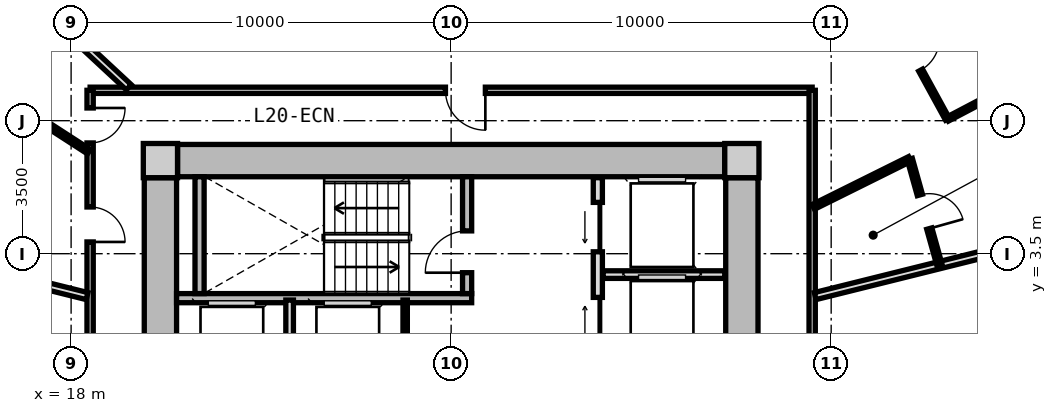
"""IFC4 building model, lengths in metres.
Left out: names, types, materials, properties, quantities, classifications, styles, units other than length and angle.
Written with IfcOpenShell. Run it as: python <this file> out.ifc"""

import sys

from ifc_helpers import new_model, si_unit, direction, frame, frame_2d, origin, origin_2d, place, context, subcontext, project, spatial, rectangle, extrude, source, transform, mapped, element, fill, save


model = new_model("IFC4")
c1 = context("Model", 3, precision=1e-05, world=origin(), true_north=direction((0.0, 1.0)))
c2 = subcontext(c1, "Body", "Model", "MODEL_VIEW")
j1 = project(units=[si_unit("LENGTHUNIT", "METRE"), si_unit("PLANEANGLEUNIT", "RADIAN")], contexts=[c1])
p1 = place(None, origin())
s1 = spatial("IfcSite", under=j1, at=p1, CompositionType="ELEMENT")
p2 = place(p1, origin())
s2 = spatial("IfcBuilding", under=s1, at=p2, CompositionType="ELEMENT")
p3 = place(p2, frame((0.0, 0.0, 67.35)))
s3 = spatial("IfcBuildingStorey", under=s2, at=p3, CompositionType="ELEMENT", Elevation=67.35)
m1 = source(origin(), c2, "Body", "SweptSolid", [
    extrude(rectangle(XDim=0.9, YDim=0.9, at=origin_2d()), origin(), (0.0, 0.0, 1.0), 3.05),
])
for number, where, z_axis, x_axis in (
    (1, (35.65, 5.95, 0.0), (0.0, 0.0, 1.0), (1.0, 0.0, 0.0)),
    (2, (20.35, 5.95, 0.0), (0.0, 0.0, 1.0), (1.0, 0.0, 0.0)),
):
    element("IfcColumn", number, at=place(p3, frame(where, z_axis=z_axis, x_axis=x_axis)), inside=s3, PredefinedType="COLUMN", context=c2, shape_type="MappedRepresentation", body=[
        mapped(m1, transform((0.0, 0.0, 0.0), x_axis=(1.0, 0.0, 0.0), y_axis=(0.0, 1.0, 0.0), z_axis=(0.0, 0.0, 1.0), scale=1.0)),
    ])
m2 = source(origin(), c2, "Body", "SweptSolid", [
    extrude(rectangle(XDim=14.4, YDim=0.85, at=frame_2d((7.2, 0.0))), origin(), (0.0, 0.0, 1.0), 2.79),
])
p4 = place(p3, frame((20.8, 5.95, 0.0), z_axis=(0.0, 0.0, 1.0), x_axis=(1.0, 0.0, 0.0)))
e3 = element("IfcWall", 3, at=p4, inside=s3, PredefinedType="SHEAR", context=c2, shape_type="MappedRepresentation", body=[
    mapped(m2, transform((0.0, 0.0, 0.0), x_axis=(1.0, 0.0, 0.0), y_axis=(0.0, 1.0, 0.0), z_axis=(0.0, 0.0, 1.0), scale=1.0)),
])
m3 = source(origin(), c2, "Body", "SweptSolid", [
    extrude(rectangle(XDim=11.0, YDim=0.85, at=frame_2d((5.5, 0.0))), origin(), (0.0, 0.0, 1.0), 2.79),
])
p5 = place(p3, frame((20.35, -5.5, 0.0), z_axis=(0.0, 0.0, 1.0), x_axis=(0.0, 1.0, 0.0)))
e4 = element("IfcWall", 4, at=p5, inside=s3, PredefinedType="SHEAR", context=c2, shape_type="MappedRepresentation", body=[
    mapped(m3, transform((0.0, 0.0, 0.0), x_axis=(1.0, 0.0, 0.0), y_axis=(0.0, 1.0, 0.0), z_axis=(0.0, 0.0, 1.0), scale=1.0)),
])
p6 = place(p5, frame((3.8, 0.0, 0.0)))
e5 = element("IfcOpeningElement", 5, at=p6, cuts=e4, PredefinedType="OPENING", context=c2, shape_type="SweptSolid", body=[
    extrude(rectangle(XDim=1.2, YDim=2.15, at=frame_2d((0.6, 1.075))), frame((0.0, 0.435, 0.0), z_axis=(0.0, -1.0, 0.0), x_axis=(1.0, 0.0, 0.0)), (0.0, 0.0, 1.0), 0.87),
])
p7 = place(p3, frame((35.65, 5.5, 0.0), z_axis=(0.0, 0.0, 1.0), x_axis=(0.0, -1.0, 0.0)))
e6 = element("IfcWall", 6, at=p7, inside=s3, PredefinedType="SHEAR", context=c2, shape_type="MappedRepresentation", body=[
    mapped(m3, transform((0.0, 0.0, 0.0), x_axis=(1.0, 0.0, 0.0), y_axis=(0.0, 1.0, 0.0), z_axis=(0.0, 0.0, 1.0), scale=1.0)),
])
p8 = place(p7, frame((5.65, 0.0, 0.0)))
e7 = element("IfcOpeningElement", 7, at=p8, cuts=e6, PredefinedType="OPENING", context=c2, shape_type="SweptSolid", body=[
    extrude(rectangle(XDim=1.2, YDim=2.15, at=frame_2d((0.6, 1.075))), frame((0.0, 0.435, 0.0), z_axis=(0.0, -1.0, 0.0), x_axis=(1.0, 0.0, 0.0)), (0.0, 0.0, 1.0), 0.87),
])
m4 = source(origin(), c2, "Body", "SweptSolid", [
    extrude(rectangle(XDim=7.765, YDim=0.24, at=frame_2d((3.883, 0.0))), origin(), (0.0, 0.0, 1.0), 2.79),
])
p9 = place(p3, frame((20.775, 2.33, 0.0), z_axis=(0.0, 0.0, 1.0), x_axis=(1.0, 0.0, 0.0)))
e8 = element("IfcWall", 8, at=p9, inside=s3, PredefinedType="PARTITIONING", context=c2, shape_type="MappedRepresentation", body=[
    mapped(m4, transform((0.0, 0.0, 0.0), x_axis=(1.0, 0.0, 0.0), y_axis=(0.0, 1.0, 0.0), z_axis=(0.0, 0.0, 1.0), scale=1.0)),
])
m5 = source(origin(), c2, "Body", "SweptSolid", [
    extrude(rectangle(XDim=3.075, YDim=0.24, at=frame_2d((1.538, 0.0))), origin(), (0.0, 0.0, 1.0), 2.79),
])
p10 = place(p3, frame((21.38, 2.45, 0.0), z_axis=(0.0, 0.0, 1.0), x_axis=(0.0, 1.0, 0.0)))
e9 = element("IfcWall", 9, at=p10, inside=s3, PredefinedType="PARTITIONING", context=c2, shape_type="MappedRepresentation", body=[
    mapped(m5, transform((0.0, 0.0, 0.0), x_axis=(1.0, 0.0, 0.0), y_axis=(0.0, 1.0, 0.0), z_axis=(0.0, 0.0, 1.0), scale=1.0)),
])
p11 = place(p3, frame((28.42, 2.45, 0.0), z_axis=(0.0, 0.0, 1.0), x_axis=(0.0, 1.0, 0.0)))
e10 = element("IfcWall", 10, at=p11, inside=s3, PredefinedType="PARTITIONING", context=c2, shape_type="MappedRepresentation", body=[
    mapped(m5, transform((0.0, 0.0, 0.0), x_axis=(1.0, 0.0, 0.0), y_axis=(0.0, 1.0, 0.0), z_axis=(0.0, 0.0, 1.0), scale=1.0)),
])
p12 = place(p11, frame((0.55, 0.0, 0.0)))
e11 = element("IfcOpeningElement", 11, at=p12, cuts=e10, PredefinedType="OPENING", context=c2, shape_type="SweptSolid", body=[
    extrude(rectangle(XDim=1.1, YDim=2.15, at=frame_2d((0.55, 1.075))), frame((0.0, 0.13, 0.0), z_axis=(0.0, -1.0, 0.0), x_axis=(1.0, 0.0, 0.0)), (0.0, 0.0, 1.0), 0.26),
])
m6 = source(origin(), c2, "Body", "SweptSolid", [
    extrude(rectangle(XDim=5.0, YDim=0.24, at=frame_2d((2.5, 0.0))), origin(), (0.0, 0.0, 1.0), 2.775),
])
p13 = place(p3, frame((31.86, 0.5, 0.0), z_axis=(0.0, 0.0, 1.0), x_axis=(0.0, 1.0, 0.0)))
e12 = element("IfcWall", 12, at=p13, inside=s3, PredefinedType="PARTITIONING", context=c2, shape_type="MappedRepresentation", body=[
    mapped(m6, transform((0.0, 0.0, 0.0), x_axis=(1.0, 0.0, 0.0), y_axis=(0.0, 1.0, 0.0), z_axis=(0.0, 0.0, 1.0), scale=1.0)),
])
p14 = place(p13, frame((3.05, 0.0, 0.0)))
e13 = element("IfcOpeningElement", 13, at=p14, cuts=e12, PredefinedType="OPENING", context=c2, shape_type="SweptSolid", body=[
    extrude(rectangle(XDim=1.3, YDim=2.2, at=frame_2d((0.65, 1.1))), frame((0.0, 0.13, 0.0), z_axis=(0.0, -1.0, 0.0), x_axis=(1.0, 0.0, 0.0)), (0.0, 0.0, 1.0), 0.26),
])
p15 = place(p13, frame((0.55, 0.0, 0.0)))
e14 = element("IfcOpeningElement", 14, at=p15, cuts=e12, PredefinedType="OPENING", context=c2, shape_type="SweptSolid", body=[
    extrude(rectangle(XDim=1.3, YDim=2.2, at=frame_2d((0.65, 1.1))), frame((0.0, 0.13, 0.0), z_axis=(0.0, -1.0, 0.0), x_axis=(1.0, 0.0, 0.0)), (0.0, 0.0, 1.0), 0.26),
])
m7 = source(origin(), c2, "Body", "SweptSolid", [
    extrude(rectangle(XDim=3.2, YDim=0.2, at=frame_2d((1.6, 0.0))), origin(), (0.0, 0.0, 1.0), 2.775),
])
p16 = place(p3, frame((32.0, 2.95, 0.0), z_axis=(0.0, 0.0, 1.0), x_axis=(1.0, 0.0, 0.0)))
e15 = element("IfcWall", 15, at=p16, inside=s3, PredefinedType="PARTITIONING", context=c2, shape_type="MappedRepresentation", body=[
    mapped(m7, transform((0.0, 0.0, 0.0), x_axis=(1.0, 0.0, 0.0), y_axis=(0.0, 1.0, 0.0), z_axis=(0.0, 0.0, 1.0), scale=1.0)),
])
m8 = source(origin(), c2, "Body", "SweptSolid", [
    extrude(rectangle(XDim=2.33, YDim=0.115, at=frame_2d((1.165, 0.0))), origin(), (0.0, 0.0, 1.0), 2.775),
])
p17 = place(p3, frame((26.79, -0.05, 0.0), z_axis=(0.0, 0.0, 1.0), x_axis=(0.0, 1.0, 0.0)))
e16 = element("IfcWall", 16, at=p17, inside=s3, PredefinedType="PARTITIONING", context=c2, shape_type="MappedRepresentation", body=[
    mapped(m8, transform((0.0, 0.0, 0.0), x_axis=(1.0, 0.0, 0.0), y_axis=(0.0, 1.0, 0.0), z_axis=(0.0, 0.0, 1.0), scale=1.0)),
])
m9 = source(origin(), c2, "Body", "SweptSolid", [
    extrude(rectangle(XDim=2.33, YDim=0.2, at=frame_2d((1.165, 0.0))), origin(), (0.0, 0.0, 1.0), 2.775),
])
p18 = place(p3, frame((23.75, -0.05, 0.0), z_axis=(0.0, 0.0, 1.0), x_axis=(0.0, 1.0, 0.0)))
e17 = element("IfcWall", 17, at=p18, inside=s3, PredefinedType="PARTITIONING", context=c2, shape_type="MappedRepresentation", body=[
    mapped(m9, transform((0.0, 0.0, 0.0), x_axis=(1.0, 0.0, 0.0), y_axis=(0.0, 1.0, 0.0), z_axis=(0.0, 0.0, 1.0), scale=1.0)),
])
m10 = source(origin(), c2, "Body", "SweptSolid", [
    extrude(rectangle(XDim=19.0, YDim=0.165, at=frame_2d((9.5, 0.0))), origin(), (0.0, 0.0, 1.0), 2.775),
])
p19 = place(p3, frame((18.5, 7.8, 0.0), z_axis=(0.0, 0.0, 1.0), x_axis=(1.0, 0.0, 0.0)))
e18 = element("IfcWall", 18, at=p19, inside=s3, PredefinedType="PARTITIONING", context=c2, shape_type="MappedRepresentation", body=[
    mapped(m10, transform((0.0, 0.0, 0.0), x_axis=(1.0, 0.0, 0.0), y_axis=(0.0, 1.0, 0.0), z_axis=(0.0, 0.0, 1.0), scale=1.0)),
])
p20 = place(p19, frame((9.35, 0.0, 0.0)))
e19 = element("IfcOpeningElement", 19, at=p20, cuts=e18, PredefinedType="OPENING", context=c2, shape_type="SweptSolid", body=[
    extrude(rectangle(XDim=1.05, YDim=2.15, at=frame_2d((0.525, 1.075))), frame((0.0, 0.093, 0.0), z_axis=(0.0, -1.0, 0.0), x_axis=(1.0, 0.0, 0.0)), (0.0, 0.0, 1.0), 0.185),
])
m11 = source(origin(), c2, "Body", "SweptSolid", [
    extrude(rectangle(XDim=15.6, YDim=0.165, at=frame_2d((7.8, 0.0))), origin(), (0.0, 0.0, 1.0), 2.775),
])
p21 = place(p3, frame((18.5, -7.8, 0.0), z_axis=(0.0, 0.0, 1.0), x_axis=(0.0, 1.0, 0.0)))
e20 = element("IfcWall", 20, at=p21, inside=s3, PredefinedType="PARTITIONING", context=c2, shape_type="MappedRepresentation", body=[
    mapped(m11, transform((0.0, 0.0, 0.0), x_axis=(1.0, 0.0, 0.0), y_axis=(0.0, 1.0, 0.0), z_axis=(0.0, 0.0, 1.0), scale=1.0)),
])
p22 = place(p21, frame((14.215, 0.0, 0.0)))
e21 = element("IfcOpeningElement", 21, at=p22, cuts=e20, PredefinedType="OPENING", context=c2, shape_type="SweptSolid", body=[
    extrude(rectangle(XDim=0.92, YDim=2.1, at=frame_2d((0.46, 1.05))), frame((0.0, 0.093, 0.0), z_axis=(0.0, -1.0, 0.0), x_axis=(1.0, 0.0, 0.0)), (0.0, 0.0, 1.0), 0.185),
])
p23 = place(p21, frame((11.609, 0.0, 0.0)))
e22 = element("IfcOpeningElement", 22, at=p23, cuts=e20, PredefinedType="OPENING", context=c2, shape_type="SweptSolid", body=[
    extrude(rectangle(XDim=0.92, YDim=2.1, at=frame_2d((0.46, 1.05))), frame((0.0, 0.093, 0.0), z_axis=(0.0, -1.0, 0.0), x_axis=(1.0, 0.0, 0.0)), (0.0, 0.0, 1.0), 0.185),
])
p24 = place(p21, frame((7.175, 0.0, 0.0)))
e23 = element("IfcOpeningElement", 23, at=p24, cuts=e20, PredefinedType="OPENING", context=c2, shape_type="SweptSolid", body=[
    extrude(rectangle(XDim=1.25, YDim=2.2, at=frame_2d((0.625, 1.1))), frame((0.0, 0.093, 0.0), z_axis=(0.0, -1.0, 0.0), x_axis=(1.0, 0.0, 0.0)), (0.0, 0.0, 1.0), 0.185),
])
p25 = place(p3, frame((37.5, 7.8, 0.0), z_axis=(0.0, 0.0, 1.0), x_axis=(0.0, -1.0, 0.0)))
e24 = element("IfcWall", 24, at=p25, inside=s3, PredefinedType="PARTITIONING", context=c2, shape_type="MappedRepresentation", body=[
    mapped(m11, transform((0.0, 0.0, 0.0), x_axis=(1.0, 0.0, 0.0), y_axis=(0.0, 1.0, 0.0), z_axis=(0.0, 0.0, 1.0), scale=1.0)),
])
p26 = place(p25, frame((8.835, 0.0, 0.0)))
e25 = element("IfcOpeningElement", 25, at=p26, cuts=e24, PredefinedType="OPENING", context=c2, shape_type="SweptSolid", body=[
    extrude(rectangle(XDim=1.05, YDim=2.15, at=frame_2d((0.525, 1.075))), frame((0.0, 0.093, 0.0), z_axis=(0.0, -1.0, 0.0), x_axis=(1.0, 0.0, 0.0)), (0.0, 0.0, 1.0), 0.185),
])
m12 = source(origin(), c2, "Body", "SweptSolid", [
    extrude(rectangle(XDim=9.737, YDim=0.19, at=frame_2d((4.869, 0.0))), origin(), (0.0, 0.0, 1.0), 2.225),
])
p27 = place(p3, frame((37.58, 2.385, 0.0), z_axis=(0.0, 0.0, 1.0), x_axis=(0.970392716238, 0.241532557375, 0.0)))
e26 = element("IfcWall", 26, at=p27, inside=s3, PredefinedType="PARTITIONING", context=c2, shape_type="MappedRepresentation", body=[
    mapped(m12, transform((0.0, 0.0, 0.0), x_axis=(1.0, 0.0, 0.0), y_axis=(0.0, 1.0, 0.0), z_axis=(0.0, 0.0, 1.0), scale=1.0)),
])
m13 = source(origin(), c2, "Body", "SweptSolid", [
    extrude(rectangle(XDim=7.435, YDim=0.19, at=frame_2d((3.717, 0.0))), origin(), (0.0, 0.0, 1.0), 2.225),
])
p28 = place(p3, frame((19.517, 7.88, 0.0), z_axis=(0.0, 0.0, 1.0), x_axis=(-0.732651956848, 0.680603489652, 0.0)))
e27 = element("IfcWall", 27, at=p28, inside=s3, PredefinedType="PARTITIONING", context=c2, shape_type="MappedRepresentation", body=[
    mapped(m13, transform((0.0, 0.0, 0.0), x_axis=(1.0, 0.0, 0.0), y_axis=(0.0, 1.0, 0.0), z_axis=(0.0, 0.0, 1.0), scale=1.0)),
])
m14 = source(origin(), c2, "Body", "SweptSolid", [
    extrude(rectangle(XDim=2.834, YDim=0.14, at=frame_2d((1.417, 0.0))), origin(), (0.0, 0.0, 1.0), 2.775),
])
p29 = place(p3, frame((37.53, 4.732, 0.0), z_axis=(0.0, 0.0, 1.0), x_axis=(0.895681174462, 0.444696788513, 0.0)))
e28 = element("IfcWall", 28, at=p29, inside=s3, PredefinedType="PARTITIONING", context=c2, shape_type="MappedRepresentation", body=[
    mapped(m14, transform((0.0, 0.0, 0.0), x_axis=(1.0, 0.0, 0.0), y_axis=(0.0, 1.0, 0.0), z_axis=(0.0, 0.0, 1.0), scale=1.0)),
])
m15 = source(origin(), c2, "Body", "SweptSolid", [
    extrude(rectangle(XDim=2.885, YDim=0.14, at=frame_2d((1.442, 0.0))), origin(), (0.0, 0.0, 1.0), 2.775),
])
p30 = place(p3, frame((40.069, 5.992, 0.0), z_axis=(0.0, 0.0, 1.0), x_axis=(0.269799431837, -0.962916541856, 0.0)))
e29 = element("IfcWall", 29, at=p30, inside=s3, PredefinedType="PARTITIONING", context=c2, shape_type="MappedRepresentation", body=[
    mapped(m15, transform((0.0, 0.0, 0.0), x_axis=(1.0, 0.0, 0.0), y_axis=(0.0, 1.0, 0.0), z_axis=(0.0, 0.0, 1.0), scale=1.0)),
])
p31 = place(p30, frame((0.982, 0.0, 0.0)))
e30 = element("IfcOpeningElement", 30, at=p31, cuts=e29, PredefinedType="OPENING", context=c2, shape_type="SweptSolid", body=[
    extrude(rectangle(XDim=0.92, YDim=2.1, at=frame_2d((0.46, 1.05))), frame((0.0, 0.08, 0.0), z_axis=(0.0, -1.0, 0.0), x_axis=(1.0, 0.0, 0.0)), (0.0, 0.0, 1.0), 0.16),
])
m16 = source(origin(), c2, "Body", "SweptSolid", [
    extrude(rectangle(XDim=3.864, YDim=0.115, at=frame_2d((1.932, 0.0))), origin(), (0.0, 0.0, 1.0), 2.775),
])
p32 = place(p3, frame((41.06, 7.041, 0.0), z_axis=(0.0, 0.0, 1.0), x_axis=(0.885194959803, 0.465220252289, 0.0)))
e31 = element("IfcWall", 31, at=p32, inside=s3, PredefinedType="PARTITIONING", context=c2, shape_type="MappedRepresentation", body=[
    mapped(m16, transform((0.0, 0.0, 0.0), x_axis=(1.0, 0.0, 0.0), y_axis=(0.0, 1.0, 0.0), z_axis=(0.0, 0.0, 1.0), scale=1.0)),
])
m17 = source(origin(), c2, "Body", "SweptSolid", [
    extrude(rectangle(XDim=3.888, YDim=0.115, at=frame_2d((1.944, 0.0))), origin(), (0.0, 0.0, 1.0), 2.775),
])
p33 = place(p3, frame((41.06, 7.041, 0.0), z_axis=(0.0, 0.0, 1.0), x_axis=(-0.480382482853, 0.877059103007, 0.0)))
e32 = element("IfcWall", 32, at=p33, inside=s3, PredefinedType="PARTITIONING", context=c2, shape_type="MappedRepresentation", body=[
    mapped(m17, transform((0.0, 0.0, 0.0), x_axis=(1.0, 0.0, 0.0), y_axis=(0.0, 1.0, 0.0), z_axis=(0.0, 0.0, 1.0), scale=1.0)),
])
p34 = place(p33, frame((1.469, 0.0, 0.0)))
e33 = element("IfcOpeningElement", 33, at=p34, cuts=e32, PredefinedType="OPENING", context=c2, shape_type="SweptSolid", body=[
    extrude(rectangle(XDim=0.95, YDim=2.1, at=frame_2d((0.475, 1.05))), frame((0.0, 0.067, 0.0), z_axis=(0.0, -1.0, 0.0), x_axis=(1.0, 0.0, 0.0)), (0.0, 0.0, 1.0), 0.135),
])
m18 = source(origin(), c2, "Body", "SweptSolid", [
    extrude(rectangle(XDim=9.737, YDim=0.19, at=frame_2d((4.869, 0.0))), origin(), (0.0, 0.0, 1.0), 2.415),
])
p35 = place(p3, frame((18.42, 2.385, 0.0), z_axis=(0.0, 0.0, 1.0), x_axis=(-0.970392716238, 0.241532557375, 0.0)))
e34 = element("IfcWall", 34, at=p35, inside=s3, PredefinedType="PARTITIONING", context=c2, shape_type="MappedRepresentation", body=[
    mapped(m18, transform((0.0, 0.0, 0.0), x_axis=(1.0, 0.0, 0.0), y_axis=(0.0, 1.0, 0.0), z_axis=(0.0, 0.0, 1.0), scale=1.0)),
])
m19 = source(origin(), c2, "Body", "SweptSolid", [
    extrude(rectangle(XDim=7.304, YDim=0.14, at=frame_2d((3.652, 0.0))), origin(), (0.0, 0.0, 1.0), 2.775),
])
p36 = place(p3, frame((18.47, 6.185, 0.0), z_axis=(0.0, 0.0, 1.0), x_axis=(-0.83973870965, 0.54299069929, 0.0)))
e35 = element("IfcWall", 35, at=p36, inside=s3, PredefinedType="PARTITIONING", context=c2, shape_type="MappedRepresentation", body=[
    mapped(m19, transform((0.0, 0.0, 0.0), x_axis=(1.0, 0.0, 0.0), y_axis=(0.0, 1.0, 0.0), z_axis=(0.0, 0.0, 1.0), scale=1.0)),
])
m20 = source(origin(), c2, "Body", "SweptSolid", [
    extrude(rectangle(XDim=1.1, YDim=2.15, at=frame_2d((0.55, 1.075))), frame((0.0, 0.025, 0.0), z_axis=(0.0, -1.0, 0.0), x_axis=(1.0, 0.0, 0.0)), (0.0, 0.0, 1.0), 0.05),
])
p37 = place(p12, origin())
e36 = element("IfcDoor", 36, at=p37, inside=s3, OperationType="SINGLE_SWING_LEFT", PredefinedType="DOOR", context=c2, shape_type="MappedRepresentation", body=[
    mapped(m20, transform((0.0, 0.0, 0.0), x_axis=(1.0, 0.0, 0.0), y_axis=(0.0, 1.0, 0.0), z_axis=(0.0, 0.0, 1.0), scale=1.0)),
])
fill(e11, e36)
m21 = source(origin(), c2, "Body", "SweptSolid", [
    extrude(rectangle(XDim=1.3, YDim=2.2, at=frame_2d((0.65, 1.1))), frame((0.0, 0.025, 0.0), z_axis=(0.0, -1.0, 0.0), x_axis=(1.0, 0.0, 0.0)), (0.0, 0.0, 1.0), 0.05),
])
p38 = place(p14, origin())
e37 = element("IfcDoor", 37, at=p38, inside=s3, OperationType="SLIDING_TO_LEFT", PredefinedType="DOOR", context=c2, shape_type="MappedRepresentation", body=[
    mapped(m21, transform((0.0, 0.0, 0.0), x_axis=(1.0, 0.0, 0.0), y_axis=(0.0, 1.0, 0.0), z_axis=(0.0, 0.0, 1.0), scale=1.0)),
])
fill(e13, e37)
p39 = place(p15, origin())
e38 = element("IfcDoor", 38, at=p39, inside=s3, OperationType="SLIDING_TO_RIGHT", PredefinedType="DOOR", context=c2, shape_type="MappedRepresentation", body=[
    mapped(m21, transform((0.0, 0.0, 0.0), x_axis=(1.0, 0.0, 0.0), y_axis=(0.0, 1.0, 0.0), z_axis=(0.0, 0.0, 1.0), scale=1.0)),
])
fill(e14, e38)
m22 = source(origin(), c2, "Body", "SweptSolid", [
    extrude(rectangle(XDim=1.05, YDim=2.15, at=frame_2d((0.525, 1.075))), frame((0.0, 0.025, 0.0), z_axis=(0.0, -1.0, 0.0), x_axis=(1.0, 0.0, 0.0)), (0.0, 0.0, 1.0), 0.05),
])
p40 = place(p20, frame((1.05, 0.0, 0.0), z_axis=(0.0, 0.0, 1.0), x_axis=(-1.0, 0.0, 0.0)))
e39 = element("IfcDoor", 39, at=p40, inside=s3, OperationType="SINGLE_SWING_LEFT", PredefinedType="DOOR", context=c2, shape_type="MappedRepresentation", body=[
    mapped(m22, transform((0.0, 0.0, 0.0), x_axis=(1.0, 0.0, 0.0), y_axis=(0.0, 1.0, 0.0), z_axis=(0.0, 0.0, 1.0), scale=1.0)),
])
fill(e19, e39)
m23 = source(origin(), c2, "Body", "SweptSolid", [
    extrude(rectangle(XDim=0.92, YDim=2.1, at=frame_2d((0.46, 1.05))), frame((0.0, 0.025, 0.0), z_axis=(0.0, -1.0, 0.0), x_axis=(1.0, 0.0, 0.0)), (0.0, 0.0, 1.0), 0.05),
])
p41 = place(p31, origin())
e40 = element("IfcDoor", 40, at=p41, inside=s3, OperationType="SINGLE_SWING_RIGHT", PredefinedType="DOOR", context=c2, shape_type="MappedRepresentation", body=[
    mapped(m23, transform((0.0, 0.0, 0.0), x_axis=(1.0, 0.0, 0.0), y_axis=(0.0, 1.0, 0.0), z_axis=(0.0, 0.0, 1.0), scale=1.0)),
])
fill(e30, e40)
m24 = source(origin(), c2, "Body", "SweptSolid", [
    extrude(rectangle(XDim=0.95, YDim=2.1, at=frame_2d((0.475, 1.05))), frame((0.0, 0.025, 0.0), z_axis=(0.0, -1.0, 0.0), x_axis=(1.0, 0.0, 0.0)), (0.0, 0.0, 1.0), 0.05),
])
p42 = place(p34, frame((0.95, 0.0, 0.0), z_axis=(0.0, 0.0, 1.0), x_axis=(-1.0, 0.0, 0.0)))
e41 = element("IfcDoor", 41, at=p42, inside=s3, OperationType="SINGLE_SWING_LEFT", PredefinedType="DOOR", context=c2, shape_type="MappedRepresentation", body=[
    mapped(m24, transform((0.0, 0.0, 0.0), x_axis=(1.0, 0.0, 0.0), y_axis=(0.0, 1.0, 0.0), z_axis=(0.0, 0.0, 1.0), scale=1.0)),
])
fill(e33, e41)
p43 = place(p22, frame((0.92, 0.0, 0.0), z_axis=(0.0, 0.0, 1.0), x_axis=(-1.0, 0.0, 0.0)))
e42 = element("IfcDoor", 42, at=p43, inside=s3, OperationType="SINGLE_SWING_LEFT", PredefinedType="DOOR", context=c2, shape_type="MappedRepresentation", body=[
    mapped(m23, transform((0.0, 0.0, 0.0), x_axis=(1.0, 0.0, 0.0), y_axis=(0.0, 1.0, 0.0), z_axis=(0.0, 0.0, 1.0), scale=1.0)),
])
fill(e21, e42)
p44 = place(p23, frame((0.92, 0.0, 0.0), z_axis=(0.0, 0.0, 1.0), x_axis=(-1.0, 0.0, 0.0)))
e43 = element("IfcDoor", 43, at=p44, inside=s3, OperationType="SINGLE_SWING_RIGHT", PredefinedType="DOOR", context=c2, shape_type="MappedRepresentation", body=[
    mapped(m23, transform((0.0, 0.0, 0.0), x_axis=(1.0, 0.0, 0.0), y_axis=(0.0, 1.0, 0.0), z_axis=(0.0, 0.0, 1.0), scale=1.0)),
])
fill(e22, e43)
save(model, sys.argv[1])
